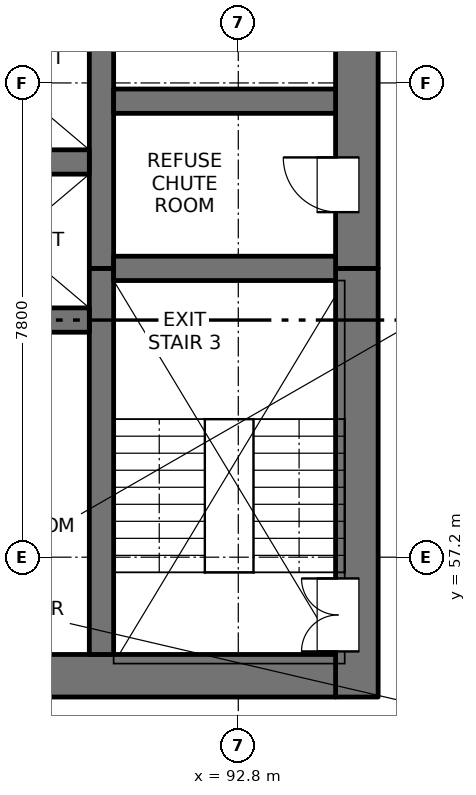
"""IFC4 building model, lengths in metres.
Left out: names, types, materials, properties, quantities, classifications, styles, units other than length and angle.
Written with IfcOpenShell. Run it as: python <this file> out.ifc"""

import sys

from ifc_helpers import new_model, si_unit, direction, frame, frame_2d, origin, place, context, subcontext, project, spatial, rectangle, extrude, element, fill, save


model = new_model("IFC4")
c1 = context("Model", 3, precision=1e-05, world=origin(), true_north=direction((0.0, 1.0)))
c2 = subcontext(c1, "Body", "Model", "MODEL_VIEW")
j1 = project(units=[si_unit("LENGTHUNIT", "METRE"), si_unit("PLANEANGLEUNIT", "RADIAN")], contexts=[c1])
p1 = place(None, origin())
s1 = spatial("IfcSite", under=j1, at=p1, CompositionType="ELEMENT")
p2 = place(p1, origin())
s2 = spatial("IfcBuilding", under=s1, at=p2, CompositionType="ELEMENT")
p3 = place(p2, frame((0.0, 0.0, 36.5)))
s3 = spatial("IfcBuildingStorey", under=s2, at=p3, CompositionType="ELEMENT", Elevation=36.5)
p4 = place(p3, frame((94.75, 54.9, -0.25), z_axis=(0.0, 0.0, 1.0), x_axis=(0.0, 1.0, 0.0)))
e1 = element("IfcWall", 1, at=p4, inside=s3, PredefinedType="SOLIDWALL", context=c2, shape_type="SweptSolid", body=[
    extrude(rectangle(XDim=7.05, YDim=0.7, at=frame_2d((3.525, 0.0))), origin(), (0.0, 0.0, 1.0), 3.4),
])
p5 = place(p4, frame((0.75, 0.0, 0.25)))
e2 = element("IfcOpeningElement", 2, at=p5, cuts=e1, PredefinedType="OPENING", context=c2, shape_type="SweptSolid", body=[
    extrude(rectangle(XDim=1.2, YDim=2.1, at=frame_2d((0.6, 1.05))), frame((0.0, 0.36, 0.0), z_axis=(0.0, -1.0, 0.0), x_axis=(1.0, 0.0, 0.0)), (0.0, 0.0, 1.0), 0.72),
])
p6 = place(p3, frame((94.75, 61.95, -0.25), z_axis=(0.0, 0.0, 1.0), x_axis=(0.0, 1.0, 0.0)))
e3 = element("IfcWall", 3, at=p6, inside=s3, PredefinedType="SOLIDWALL", context=c2, shape_type="SweptSolid", body=[
    extrude(rectangle(XDim=15.35, YDim=0.7, at=frame_2d((7.675, 0.0))), origin(), (0.0, 0.0, 1.0), 3.4),
])
p7 = place(p6, frame((0.925, 0.0, 0.25)))
e4 = element("IfcOpeningElement", 4, at=p7, cuts=e3, PredefinedType="OPENING", context=c2, shape_type="SweptSolid", body=[
    extrude(rectangle(XDim=0.9, YDim=2.1, at=frame_2d((0.45, 1.05))), frame((0.0, 0.36, 0.0), z_axis=(0.0, -1.0, 0.0), x_axis=(1.0, 0.0, 0.0)), (0.0, 0.0, 1.0), 0.72),
])
p8 = place(p6, frame((3.8, 0.0, 0.25)))
e5 = element("IfcOpeningElement", 5, at=p8, cuts=e3, PredefinedType="OPENING", context=c2, shape_type="SweptSolid", body=[
    extrude(rectangle(XDim=0.9, YDim=2.1, at=frame_2d((0.45, 1.05))), frame((0.0, 0.36, 0.0), z_axis=(0.0, -1.0, 0.0), x_axis=(1.0, 0.0, 0.0)), (0.0, 0.0, 1.0), 0.72),
])
p9 = place(p6, frame((6.8, 0.0, 0.25)))
e6 = element("IfcOpeningElement", 6, at=p9, cuts=e3, PredefinedType="OPENING", context=c2, shape_type="SweptSolid", body=[
    extrude(rectangle(XDim=0.9, YDim=2.1, at=frame_2d((0.45, 1.05))), frame((0.0, 0.36, 0.0), z_axis=(0.0, -1.0, 0.0), x_axis=(1.0, 0.0, 0.0)), (0.0, 0.0, 1.0), 0.72),
])
p10 = place(p6, frame((9.8, 0.0, 0.25)))
e7 = element("IfcOpeningElement", 7, at=p10, cuts=e3, PredefinedType="OPENING", context=c2, shape_type="SweptSolid", body=[
    extrude(rectangle(XDim=0.9, YDim=2.1, at=frame_2d((0.45, 1.05))), frame((0.0, 0.36, 0.0), z_axis=(0.0, -1.0, 0.0), x_axis=(1.0, 0.0, 0.0)), (0.0, 0.0, 1.0), 0.72),
])
p11 = place(p6, frame((13.1, 0.0, 0.25)))
e8 = element("IfcOpeningElement", 8, at=p11, cuts=e3, PredefinedType="OPENING", context=c2, shape_type="SweptSolid", body=[
    extrude(rectangle(XDim=0.9, YDim=2.1, at=frame_2d((0.45, 1.05))), frame((0.0, 0.36, 0.0), z_axis=(0.0, -1.0, 0.0), x_axis=(1.0, 0.0, 0.0)), (0.0, 0.0, 1.0), 0.72),
])
p12 = place(p3, frame((75.6, 55.25, -0.25), z_axis=(0.0, 0.0, 1.0), x_axis=(1.0, 0.0, 0.0)))
e9 = element("IfcWall", 9, at=p12, inside=s3, PredefinedType="SOLIDWALL", context=c2, shape_type="SweptSolid", body=[
    extrude(rectangle(XDim=18.8, YDim=0.7, at=frame_2d((9.4, 0.0))), origin(), (0.0, 0.0, 1.0), 3.4),
])
p13 = place(p12, frame((8.65, 0.0, 0.25)))
e10 = element("IfcOpeningElement", 10, at=p13, cuts=e9, PredefinedType="OPENING", context=c2, shape_type="SweptSolid", body=[
    extrude(rectangle(XDim=1.5, YDim=2.1, at=frame_2d((0.75, 1.05))), frame((0.0, 0.36, 0.0), z_axis=(0.0, -1.0, 0.0), x_axis=(1.0, 0.0, 0.0)), (0.0, 0.0, 1.0), 0.72),
])
p14 = place(p3, frame((90.55, 55.6, -0.25), z_axis=(0.0, 0.0, 1.0), x_axis=(0.0, 1.0, 0.0)))
e11 = element("IfcWall", 11, at=p14, inside=s3, PredefinedType="SOLIDWALL", context=c2, shape_type="SweptSolid", body=[
    extrude(rectangle(XDim=6.35, YDim=0.4, at=frame_2d((3.175, 0.0))), origin(), (0.0, 0.0, 1.0), 3.4),
])
p15 = place(p3, frame((90.55, 61.95, -0.25), z_axis=(0.0, 0.0, 1.0), x_axis=(0.0, 1.0, 0.0)))
e12 = element("IfcWall", 12, at=p15, inside=s3, PredefinedType="SOLIDWALL", context=c2, shape_type="SweptSolid", body=[
    extrude(rectangle(XDim=15.35, YDim=0.4, at=frame_2d((7.675, 0.0))), origin(), (0.0, 0.0, 1.0), 3.4),
])
for number, where, z_axis, x_axis in (
    (13, (87.35, 61.1, -0.25), (0.0, 0.0, 1.0), (1.0, 0.0, 0.0)),
    (14, (87.35, 63.7, -0.25), (0.0, 0.0, 1.0), (1.0, 0.0, 0.0)),
):
    element("IfcWall", number, at=place(p3, frame(where, z_axis=z_axis, x_axis=x_axis)), inside=s3, PredefinedType="SOLIDWALL", context=c2, shape_type="SweptSolid", body=[
        extrude(rectangle(XDim=3.0, YDim=0.4, at=frame_2d((1.5, 0.0))), origin(), (0.0, 0.0, 1.0), 3.4),
    ])
for number, where, z_axis, x_axis in (
    (15, (90.75, 61.95, -0.25), (0.0, 0.0, 1.0), (1.0, 0.0, 0.0)),
    (16, (90.75, 64.7, -0.25), (0.0, 0.0, 1.0), (1.0, 0.0, 0.0)),
):
    element("IfcWall", number, at=place(p3, frame(where, z_axis=z_axis, x_axis=x_axis)), inside=s3, PredefinedType="SOLIDWALL", context=c2, shape_type="SweptSolid", body=[
        extrude(rectangle(XDim=3.65, YDim=0.4, at=frame_2d((1.825, 0.0))), origin(), (0.0, 0.0, 1.0), 3.4),
    ])
p16 = place(p5, origin())
e17 = element("IfcDoor", 17, at=p16, inside=s3, OperationType="DOUBLE_DOOR_SINGLE_SWING", PredefinedType="DOOR", context=c2, shape_type="SweptSolid", body=[
    extrude(rectangle(XDim=1.2, YDim=2.1, at=frame_2d((0.6, 1.05))), frame((0.0, 0.335, 0.0), z_axis=(0.0, -1.0, 0.0), x_axis=(1.0, 0.0, 0.0)), (0.0, 0.0, 1.0), 0.05),
])
fill(e2, e17)
p17 = place(p7, origin())
e18 = element("IfcDoor", 18, at=p17, inside=s3, OperationType="SINGLE_SWING_RIGHT", PredefinedType="DOOR", context=c2, shape_type="SweptSolid", body=[
    extrude(rectangle(XDim=0.9, YDim=2.1, at=frame_2d((0.45, 1.05))), frame((0.0, 0.335, 0.0), z_axis=(0.0, -1.0, 0.0), x_axis=(1.0, 0.0, 0.0)), (0.0, 0.0, 1.0), 0.05),
])
fill(e4, e18)
save(model, sys.argv[1])
